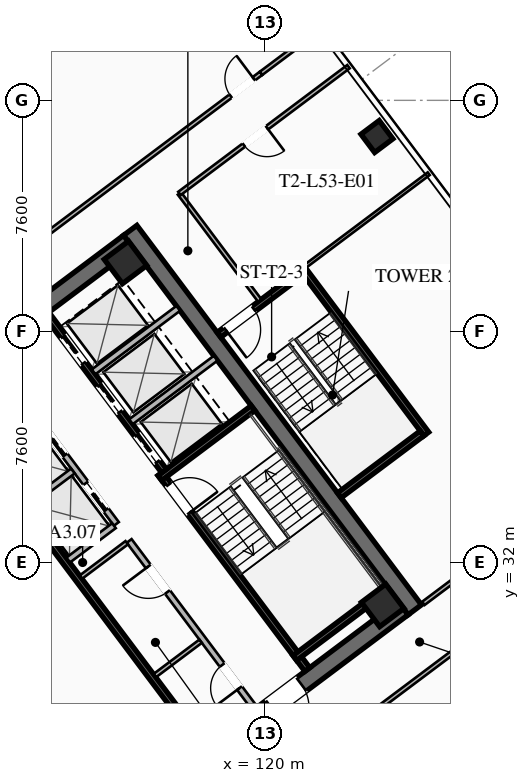
"""IFC4 building model, lengths in metres.
Left out: names, types, materials, properties, quantities, classifications, styles, units other than length and angle.
Written with IfcOpenShell. Run it as: python <this file> out.ifc"""

import sys

from ifc_helpers import new_model, si_unit, direction, frame, frame_2d, origin, origin_2d, place, context, subcontext, project, spatial, rectangle, hollow_rectangle, extrude, element, fill, save


model = new_model("IFC4")
c1 = context("Model", 3, precision=1e-05, world=origin(), true_north=direction((0.0, 1.0)))
c2 = subcontext(c1, "Body", "Model", "MODEL_VIEW")
j1 = project(units=[si_unit("LENGTHUNIT", "METRE"), si_unit("PLANEANGLEUNIT", "RADIAN")], contexts=[c1])
p1 = place(None, origin())
s1 = spatial("IfcSite", under=j1, at=p1, CompositionType="ELEMENT")
p2 = place(p1, origin())
s2 = spatial("IfcBuilding", under=s1, at=p2, CompositionType="ELEMENT")
p3 = place(p2, frame((0.0, 0.0, 196.05)))
s3 = spatial("IfcBuildingStorey", under=s2, at=p3, CompositionType="ELEMENT", Elevation=196.05)
p4 = place(p3, frame((115.564, 42.923, 0.0), z_axis=(0.0, 0.0, 1.0), x_axis=(0.600005007985, -0.799996243986, 0.0)))
e1 = element("IfcWall", 1, at=p4, inside=s3, PredefinedType="SHEAR", context=c2, shape_type="SweptSolid", body=[
    extrude(rectangle(XDim=15.6, YDim=0.55, at=frame_2d((7.8, 0.0))), origin(), (0.0, 0.0, 1.0), 3.55),
])
p5 = place(p3, frame((124.539, 30.498, 0.0), z_axis=(0.0, 0.0, 1.0), x_axis=(-0.799998054672, -0.600002593761, 0.0)))
e2 = element("IfcWall", 2, at=p5, inside=s3, PredefinedType="SHEAR", context=c2, shape_type="SweptSolid", body=[
    extrude(rectangle(XDim=15.06, YDim=0.55, at=frame_2d((7.53, 0.0))), origin(), (0.0, 0.0, 1.0), 3.55),
])
p6 = place(p5, frame((9.23, 0.0, 0.0)))
e3 = element("IfcOpeningElement", 3, at=p6, cuts=e2, PredefinedType="OPENING", context=c2, shape_type="SweptSolid", body=[
    extrude(rectangle(XDim=1.25, YDim=2.25, at=frame_2d((0.625, 1.125))), frame((0.0, 0.285, 0.0), z_axis=(0.0, -1.0, 0.0), x_axis=(1.0, 0.0, 0.0)), (0.0, 0.0, 1.0), 0.57),
])
p7 = place(p5, frame((4.18, 0.0, 0.0)))
e4 = element("IfcOpeningElement", 4, at=p7, cuts=e2, PredefinedType="OPENING", context=c2, shape_type="SweptSolid", body=[
    extrude(rectangle(XDim=1.25, YDim=2.25, at=frame_2d((0.625, 1.125))), frame((0.0, 0.285, 0.0), z_axis=(0.0, -1.0, 0.0), x_axis=(1.0, 0.0, 0.0)), (0.0, 0.0, 1.0), 0.57),
])
p8 = place(p3, frame((103.461, 33.502, 0.0), z_axis=(0.0, 0.0, 1.0), x_axis=(0.799998054672, 0.600002593761, 0.0)))
e5 = element("IfcWall", 5, at=p8, inside=s3, PredefinedType="SHEAR", context=c2, shape_type="SweptSolid", body=[
    extrude(rectangle(XDim=15.06, YDim=0.55, at=frame_2d((7.53, 0.0))), origin(), (0.0, 0.0, 1.0), 3.55),
])
p9 = place(p8, frame((4.58, 0.0, 0.0)))
e6 = element("IfcOpeningElement", 6, at=p9, cuts=e5, PredefinedType="OPENING", context=c2, shape_type="SweptSolid", body=[
    extrude(rectangle(XDim=1.25, YDim=2.25, at=frame_2d((0.625, 1.125))), frame((0.0, 0.285, 0.0), z_axis=(0.0, -1.0, 0.0), x_axis=(1.0, 0.0, 0.0)), (0.0, 0.0, 1.0), 0.57),
])
p10 = place(p8, frame((9.63, 0.0, 0.0)))
e7 = element("IfcOpeningElement", 7, at=p10, cuts=e5, PredefinedType="OPENING", context=c2, shape_type="SweptSolid", body=[
    extrude(rectangle(XDim=1.25, YDim=2.25, at=frame_2d((0.625, 1.125))), frame((0.0, 0.285, 0.0), z_axis=(0.0, -1.0, 0.0), x_axis=(1.0, 0.0, 0.0)), (0.0, 0.0, 1.0), 0.57),
])
for number, where, z_axis, x_axis in (
    (8, (123.87, 30.59, 0.0), (0.0, 0.0, 1.0), (0.8, 0.6, 0.0)),
    (9, (115.41, 41.87, 0.0), (0.0, 0.0, 1.0), (0.8, 0.6, 0.0)),
):
    element("IfcColumn", number, at=place(p3, frame(where, z_axis=z_axis, x_axis=x_axis)), inside=s3, PredefinedType="COLUMN", context=c2, shape_type="SweptSolid", body=[
        extrude(hollow_rectangle(XDim=1.0, YDim=1.0, WallThickness=0.04, at=origin_2d()), origin(), (0.0, 0.0, 1.0), 3.25),
    ])
p11 = place(p3, frame((123.68, 46.01, 0.0), z_axis=(0.0, 0.0, 1.0), x_axis=(0.799999996291, 0.600000004945, 0.0)))
e10 = element("IfcColumn", 10, at=p11, inside=s3, PredefinedType="COLUMN", context=c2, shape_type="SweptSolid", body=[
    extrude(hollow_rectangle(XDim=0.75, YDim=0.75, WallThickness=0.032, at=origin_2d()), origin(), (0.0, 0.0, 1.0), 3.25),
])
p12 = place(p3, frame((116.56, 34.92, 0.0), z_axis=(0.0, 0.0, 1.0), x_axis=(0.59999029481, -0.8000072788, 0.0)))
e11 = element("IfcWall", 11, at=p12, inside=s3, PredefinedType="SHEAR", context=c2, shape_type="SweptSolid", body=[
    extrude(rectangle(XDim=8.05, YDim=0.2, at=frame_2d((4.025, 0.0))), origin(), (0.0, 0.0, 1.0), 3.25),
])
p13 = place(p12, frame((0.45, 0.0, 0.0)))
e12 = element("IfcOpeningElement", 12, at=p13, cuts=e11, PredefinedType="OPENING", context=c2, shape_type="SweptSolid", body=[
    extrude(rectangle(XDim=1.15, YDim=2.2, at=frame_2d((0.575, 1.1))), frame((0.0, 0.11, 0.0), z_axis=(0.0, -1.0, 0.0), x_axis=(1.0, 0.0, 0.0)), (0.0, 0.0, 1.0), 0.22),
])
for number, where, z_axis, x_axis in (
    (13, (116.54, 34.78, 0.0), (0.0, 0.0, 1.0), (0.8, 0.6, 0.0)),
    (14, (120.98, 28.86, 0.0), (0.0, 0.0, 1.0), (0.8, 0.6, 0.0)),
):
    element("IfcWall", number, at=place(p3, frame(where, z_axis=z_axis, x_axis=x_axis)), inside=s3, PredefinedType="SHEAR", context=c2, shape_type="SweptSolid", body=[
        extrude(rectangle(XDim=3.83, YDim=0.2, at=frame_2d((1.915, 0.0))), origin(), (0.0, 0.0, 1.0), 3.25),
    ])
p14 = place(p3, frame((117.998, 25.936, 0.0), z_axis=(0.0, 0.0, 1.0), x_axis=(-0.600002693989, 0.799997979501, 0.0)))
e15 = element("IfcWall", 15, at=p14, inside=s3, PredefinedType="SHEAR", context=c2, shape_type="SweptSolid", body=[
    extrude(rectangle(XDim=14.5, YDim=0.2, at=frame_2d((7.25, 0.0))), origin(), (0.0, 0.0, 1.0), 3.25),
])
p15 = place(p3, frame((114.316, 25.412, 0.0), z_axis=(0.0, 0.0, 1.0), x_axis=(0.800018601094, 0.59997519774, 0.0)))
e16 = element("IfcWall", 16, at=p15, inside=s3, PredefinedType="SOLIDWALL", context=c2, shape_type="SweptSolid", body=[
    extrude(rectangle(XDim=3.15, YDim=0.22, at=frame_2d((1.575, 0.0))), origin(), (0.0, 0.0, 1.0), 2.393),
])
p16 = place(p15, frame((0.95, 0.0, 0.0)))
e17 = element("IfcOpeningElement", 17, at=p16, cuts=e16, PredefinedType="OPENING", context=c2, shape_type="SweptSolid", body=[
    extrude(rectangle(XDim=1.25, YDim=2.25, at=frame_2d((0.625, 1.125))), frame((0.0, 0.12, 0.0), z_axis=(0.0, -1.0, 0.0), x_axis=(1.0, 0.0, 0.0)), (0.0, 0.0, 1.0), 0.24),
])
p17 = place(p3, frame((115.19, 23.83, 0.0), z_axis=(0.0, 0.0, 1.0), x_axis=(-0.599993943644, 0.800004542231, 0.0)))
e18 = element("IfcWall", 18, at=p17, inside=s3, PredefinedType="SHEAR", context=c2, shape_type="SweptSolid", body=[
    extrude(rectangle(XDim=6.45, YDim=0.2, at=frame_2d((3.225, 0.0))), origin(), (0.0, 0.0, 1.0), 3.25),
])
p18 = place(p17, frame((4.875, 0.0, 0.0)))
e19 = element("IfcOpeningElement", 19, at=p18, cuts=e18, PredefinedType="OPENING", context=c2, shape_type="SweptSolid", body=[
    extrude(rectangle(XDim=1.3, YDim=2.25, at=frame_2d((0.65, 1.125))), frame((0.0, 0.11, 0.0), z_axis=(0.0, -1.0, 0.0), x_axis=(1.0, 0.0, 0.0)), (0.0, 0.0, 1.0), 0.22),
])
p19 = place(p17, frame((2.875, 0.0, 0.0)))
e20 = element("IfcOpeningElement", 20, at=p19, cuts=e18, PredefinedType="OPENING", context=c2, shape_type="SweptSolid", body=[
    extrude(rectangle(XDim=1.3, YDim=2.25, at=frame_2d((0.65, 1.125))), frame((0.0, 0.11, 0.0), z_axis=(0.0, -1.0, 0.0), x_axis=(1.0, 0.0, 0.0)), (0.0, 0.0, 1.0), 0.22),
])
p20 = place(p17, frame((0.675, 0.0, 0.0)))
e21 = element("IfcOpeningElement", 21, at=p20, cuts=e18, PredefinedType="OPENING", context=c2, shape_type="SweptSolid", body=[
    extrude(rectangle(XDim=1.3, YDim=2.25, at=frame_2d((0.65, 1.125))), frame((0.0, 0.11, 0.0), z_axis=(0.0, -1.0, 0.0), x_axis=(1.0, 0.0, 0.0)), (0.0, 0.0, 1.0), 0.22),
])
p21 = place(p3, frame((112.81, 40.17, 0.0), z_axis=(0.0, 0.0, 1.0), x_axis=(0.599993943644, -0.800004542231, 0.0)))
e22 = element("IfcWall", 22, at=p21, inside=s3, PredefinedType="SHEAR", context=c2, shape_type="SweptSolid", body=[
    extrude(rectangle(XDim=6.45, YDim=0.2, at=frame_2d((3.225, 0.0))), origin(), (0.0, 0.0, 1.0), 3.25),
])
p22 = place(p21, frame((4.975, 0.0, 0.0)))
e23 = element("IfcOpeningElement", 23, at=p22, cuts=e22, PredefinedType="OPENING", context=c2, shape_type="SweptSolid", body=[
    extrude(rectangle(XDim=1.1, YDim=2.2, at=frame_2d((0.55, 1.1))), frame((0.0, 0.11, 0.0), z_axis=(0.0, -1.0, 0.0), x_axis=(1.0, 0.0, 0.0)), (0.0, 0.0, 1.0), 0.22),
])
p23 = place(p21, frame((2.925, 0.0, 0.0)))
e24 = element("IfcOpeningElement", 24, at=p23, cuts=e22, PredefinedType="OPENING", context=c2, shape_type="SweptSolid", body=[
    extrude(rectangle(XDim=1.1, YDim=2.2, at=frame_2d((0.55, 1.1))), frame((0.0, 0.11, 0.0), z_axis=(0.0, -1.0, 0.0), x_axis=(1.0, 0.0, 0.0)), (0.0, 0.0, 1.0), 0.22),
])
p24 = place(p21, frame((0.925, 0.0, 0.0)))
e25 = element("IfcOpeningElement", 25, at=p24, cuts=e22, PredefinedType="OPENING", context=c2, shape_type="SweptSolid", body=[
    extrude(rectangle(XDim=1.1, YDim=2.2, at=frame_2d((0.55, 1.1))), frame((0.0, 0.11, 0.0), z_axis=(0.0, -1.0, 0.0), x_axis=(1.0, 0.0, 0.0)), (0.0, 0.0, 1.0), 0.22),
])
for number, where, z_axis, x_axis in (
    (26, (115.59, 36.63, 0.0), (0.0, 0.0, 1.0), (0.8, 0.6, 0.0)),
    (27, (114.36, 38.27, 0.0), (0.0, 0.0, 1.0), (0.8, 0.6, 0.0)),
):
    element("IfcWall", number, at=place(p3, frame(where, z_axis=z_axis, x_axis=x_axis)), inside=s3, PredefinedType="SOLIDWALL", context=c2, shape_type="SweptSolid", body=[
        extrude(rectangle(XDim=3.48, YDim=0.2, at=frame_2d((1.74, 0.0))), origin(), (0.0, 0.0, 1.0), 3.25),
    ])
p25 = place(p3, frame((119.67, 27.19, 0.0), z_axis=(0.0, 0.0, 1.0), x_axis=(-0.599988677396, 0.800008491828, 0.0)))
e28 = element("IfcWall", 28, at=p25, inside=s3, PredefinedType="SOLIDWALL", context=c2, shape_type="SweptSolid", body=[
    extrude(rectangle(XDim=6.9, YDim=0.2, at=frame_2d((3.45, 0.0))), origin(), (0.0, 0.0, 1.0), 2.393),
])
p26 = place(p25, frame((0.85, 0.0, 0.0)))
e29 = element("IfcOpeningElement", 29, at=p26, cuts=e28, PredefinedType="OPENING", context=c2, shape_type="SweptSolid", body=[
    extrude(rectangle(XDim=0.95, YDim=2.05, at=frame_2d((0.475, 1.025))), frame((0.0, 0.11, 0.0), z_axis=(0.0, -1.0, 0.0), x_axis=(1.0, 0.0, 0.0)), (0.0, 0.0, 1.0), 0.22),
])
p27 = place(p25, frame((4.8, 0.0, 0.0)))
e30 = element("IfcOpeningElement", 30, at=p27, cuts=e28, PredefinedType="OPENING", context=c2, shape_type="SweptSolid", body=[
    extrude(rectangle(XDim=1.05, YDim=2.2, at=frame_2d((0.525, 1.1))), frame((0.0, 0.11, 0.0), z_axis=(0.0, -1.0, 0.0), x_axis=(1.0, 0.0, 0.0)), (0.0, 0.0, 1.0), 0.22),
])
for number, where, z_axis, x_axis in (
    (31, (113.946, 31.522, 0.0), (0.0, 0.0, 1.0), (0.8, 0.6, 0.0)),
    (32, (116.376, 28.282, 0.0), (0.0, 0.0, 1.0), (0.8, 0.6, 0.0)),
):
    element("IfcWall", number, at=place(p3, frame(where, z_axis=z_axis, x_axis=x_axis)), inside=s3, PredefinedType="PARTITIONING", context=c2, shape_type="SweptSolid", body=[
        extrude(rectangle(XDim=1.88, YDim=0.135, at=frame_2d((0.94, 0.0))), origin(), (0.0, 0.0, 1.0), 2.393),
    ])
p28 = place(p3, frame((115.11, 33.27, 0.0), z_axis=(0.0, 0.0, 1.0), x_axis=(-0.600011322243, 0.799991508192, 0.0)))
e33 = element("IfcWall", 33, at=p28, inside=s3, PredefinedType="SOLIDWALL", context=c2, shape_type="SweptSolid", body=[
    extrude(rectangle(XDim=6.9, YDim=0.2, at=frame_2d((3.45, 0.0))), origin(), (0.0, 0.0, 1.0), 3.25),
])
p29 = place(p28, frame((0.575, 0.0, 0.0)))
e34 = element("IfcOpeningElement", 34, at=p29, cuts=e33, PredefinedType="OPENING", context=c2, shape_type="SweptSolid", body=[
    extrude(rectangle(XDim=1.1, YDim=2.2, at=frame_2d((0.55, 1.1))), frame((0.0, 0.11, 0.0), z_axis=(0.0, -1.0, 0.0), x_axis=(1.0, 0.0, 0.0)), (0.0, 0.0, 1.0), 0.22),
])
p30 = place(p28, frame((2.825, 0.0, 0.0)))
e35 = element("IfcOpeningElement", 35, at=p30, cuts=e33, PredefinedType="OPENING", context=c2, shape_type="SweptSolid", body=[
    extrude(rectangle(XDim=1.1, YDim=2.2, at=frame_2d((0.55, 1.1))), frame((0.0, 0.11, 0.0), z_axis=(0.0, -1.0, 0.0), x_axis=(1.0, 0.0, 0.0)), (0.0, 0.0, 1.0), 0.22),
])
p31 = place(p28, frame((5.075, 0.0, 0.0)))
e36 = element("IfcOpeningElement", 36, at=p31, cuts=e33, PredefinedType="OPENING", context=c2, shape_type="SweptSolid", body=[
    extrude(rectangle(XDim=1.1, YDim=2.2, at=frame_2d((0.55, 1.1))), frame((0.0, 0.11, 0.0), z_axis=(0.0, -1.0, 0.0), x_axis=(1.0, 0.0, 0.0)), (0.0, 0.0, 1.0), 0.22),
])
p32 = place(p3, frame((113.526, 32.082, 0.0), z_axis=(0.0, 0.0, 1.0), x_axis=(0.800046745961, 0.599937666993, 0.0)))
e37 = element("IfcWall", 37, at=p32, inside=s3, PredefinedType="SOLIDWALL", context=c2, shape_type="SweptSolid", body=[
    extrude(rectangle(XDim=1.88, YDim=0.2, at=frame_2d((0.94, 0.0))), origin(), (0.0, 0.0, 1.0), 3.25),
])
p33 = place(p3, frame((112.176, 33.882, 0.0), z_axis=(0.0, 0.0, 1.0), x_axis=(0.8, 0.6, 0.0)))
e38 = element("IfcWall", 38, at=p33, inside=s3, PredefinedType="SOLIDWALL", context=c2, shape_type="SweptSolid", body=[
    extrude(rectangle(XDim=1.88, YDim=0.2, at=frame_2d((0.94, 0.0))), origin(), (0.0, 0.0, 1.0), 3.25),
])
p34 = place(p3, frame((125.304, 36.228, 0.0), z_axis=(0.0, 0.0, 1.0), x_axis=(-0.59998851072, 0.800008616831, 0.0)))
e39 = element("IfcWall", 39, at=p34, inside=s3, PredefinedType="SHEAR", context=c2, shape_type="SweptSolid", body=[
    extrude(rectangle(XDim=6.8, YDim=0.2, at=frame_2d((3.4, 0.0))), origin(), (0.0, 0.0, 1.0), 3.25),
])
p35 = place(p3, frame((121.204, 41.528, 0.0), z_axis=(0.0, 0.0, 1.0), x_axis=(-0.800017232136, -0.599977023131, 0.0)))
e40 = element("IfcWall", 40, at=p35, inside=s3, PredefinedType="SHEAR", context=c2, shape_type="SweptSolid", body=[
    extrude(rectangle(XDim=3.4, YDim=0.2, at=frame_2d((1.7, 0.0))), origin(), (0.0, 0.0, 1.0), 3.25),
])
p36 = place(p35, frame((1.975, 0.0, 0.0)))
e41 = element("IfcOpeningElement", 41, at=p36, cuts=e40, PredefinedType="OPENING", context=c2, shape_type="SweptSolid", body=[
    extrude(rectangle(XDim=1.15, YDim=2.2, at=frame_2d((0.575, 1.1))), frame((0.0, 0.11, 0.0), z_axis=(0.0, -1.0, 0.0), x_axis=(1.0, 0.0, 0.0)), (0.0, 0.0, 1.0), 0.22),
])
p37 = place(p3, frame((122.444, 34.208, 0.0), z_axis=(0.0, 0.0, 1.0), x_axis=(0.79999138319, 0.600011488909, 0.0)))
e42 = element("IfcWall", 42, at=p37, inside=s3, PredefinedType="SHEAR", context=c2, shape_type="SweptSolid", body=[
    extrude(rectangle(XDim=3.4, YDim=0.2, at=frame_2d((1.7, 0.0))), origin(), (0.0, 0.0, 1.0), 3.25),
])
p38 = place(p3, frame((119.824, 40.618, 0.0), z_axis=(0.0, 0.0, 1.0), x_axis=(-0.599982243973, 0.800013316712, 0.0)))
e43 = element("IfcWall", 43, at=p38, inside=s3, PredefinedType="PARTITIONING", context=c2, shape_type="SweptSolid", body=[
    extrude(rectangle(XDim=4.4, YDim=0.135, at=frame_2d((2.2, 0.0))), origin(), (0.0, 0.0, 1.0), 2.393),
])
p39 = place(p3, frame((96.91, 30.87, 0.0), z_axis=(0.0, 0.0, 1.0), x_axis=(0.800003062365, 0.599995916825, 0.0)))
e44 = element("IfcWall", 44, at=p39, inside=s3, PredefinedType="PARTITIONING", context=c2, shape_type="SweptSolid", body=[
    extrude(rectangle(XDim=28.7, YDim=0.135, at=frame_2d((14.35, 0.0))), origin(), (0.0, 0.0, 1.0), 2.393),
])
p40 = place(p39, frame((0.3, 0.0, 0.0)))
e45 = element("IfcOpeningElement", 45, at=p40, cuts=e44, PredefinedType="OPENING", context=c2, shape_type="SweptSolid", body=[
    extrude(rectangle(XDim=0.95, YDim=2.05, at=frame_2d((0.475, 1.025))), frame((0.0, 0.077, 0.0), z_axis=(0.0, -1.0, 0.0), x_axis=(1.0, 0.0, 0.0)), (0.0, 0.0, 1.0), 0.155),
])
p41 = place(p39, frame((27.45, 0.0, 0.0)))
e46 = element("IfcOpeningElement", 46, at=p41, cuts=e44, PredefinedType="OPENING", context=c2, shape_type="SweptSolid", body=[
    extrude(rectangle(XDim=0.95, YDim=2.05, at=frame_2d((0.475, 1.025))), frame((0.0, 0.077, 0.0), z_axis=(0.0, -1.0, 0.0), x_axis=(1.0, 0.0, 0.0)), (0.0, 0.0, 1.0), 0.155),
])
p42 = place(p3, frame((119.87, 48.09, 0.0), z_axis=(0.0, 0.0, 1.0), x_axis=(0.799975885537, 0.600032151272, 0.0)))
e47 = element("IfcWall", 47, at=p42, inside=s3, PredefinedType="PARTITIONING", context=c2, shape_type="SweptSolid", body=[
    extrude(rectangle(XDim=2.43, YDim=0.135, at=frame_2d((1.215, 0.0))), origin(), (0.0, 0.0, 1.0), 2.393),
])
p43 = place(p3, frame((131.282, 32.874, 0.0), z_axis=(0.0, 0.0, 1.0), x_axis=(-0.8, -0.6, 0.0)))
e48 = element("IfcWall", 48, at=p43, inside=s3, PredefinedType="PARTITIONING", context=c2, shape_type="SweptSolid", body=[
    extrude(rectangle(XDim=28.7, YDim=0.135, at=frame_2d((14.35, 0.0))), origin(), (0.0, 0.0, 1.0), 2.393),
])
p44 = place(p43, frame((27.37, 0.0, 0.0)))
e49 = element("IfcOpeningElement", 49, at=p44, cuts=e48, PredefinedType="OPENING", context=c2, shape_type="SweptSolid", body=[
    extrude(rectangle(XDim=0.95, YDim=2.05, at=frame_2d((0.475, 1.025))), frame((0.0, 0.077, 0.0), z_axis=(0.0, -1.0, 0.0), x_axis=(1.0, 0.0, 0.0)), (0.0, 0.0, 1.0), 0.155),
])
p45 = place(p43, frame((0.38, 0.0, 0.0)))
e50 = element("IfcOpeningElement", 50, at=p45, cuts=e48, PredefinedType="OPENING", context=c2, shape_type="SweptSolid", body=[
    extrude(rectangle(XDim=0.95, YDim=2.05, at=frame_2d((0.475, 1.025))), frame((0.0, 0.077, 0.0), z_axis=(0.0, -1.0, 0.0), x_axis=(1.0, 0.0, 0.0)), (0.0, 0.0, 1.0), 0.155),
])
p46 = place(p3, frame((122.744, 48.308, 0.0), z_axis=(0.0, 0.0, 1.0), x_axis=(-0.79997892247, -0.600028102345, 0.0)))
e51 = element("IfcWall", 51, at=p46, inside=s3, PredefinedType="PARTITIONING", context=c2, shape_type="SweptSolid", body=[
    extrude(rectangle(XDim=6.95, YDim=0.135, at=frame_2d((3.475, 0.0))), origin(), (0.0, 0.0, 1.0), 2.393),
])
p47 = place(p46, frame((3.35, 0.0, 0.0)))
e52 = element("IfcOpeningElement", 52, at=p47, cuts=e51, PredefinedType="OPENING", context=c2, shape_type="SweptSolid", body=[
    extrude(rectangle(XDim=0.95, YDim=2.05, at=frame_2d((0.475, 1.025))), frame((0.0, 0.077, 0.0), z_axis=(0.0, -1.0, 0.0), x_axis=(1.0, 0.0, 0.0)), (0.0, 0.0, 1.0), 0.155),
])
p48 = place(p3, frame((125.208, 30.656, 0.0), z_axis=(0.0, 0.0, 1.0), x_axis=(0.800006797429, 0.599990936654, 0.0)))
e53 = element("IfcWall", 53, at=p48, inside=s3, PredefinedType="PARTITIONING", context=c2, shape_type="SweptSolid", body=[
    extrude(rectangle(XDim=8.62, YDim=0.135, at=frame_2d((4.31, 0.0))), origin(), (0.0, 0.0, 1.0), 2.393),
])
p49 = place(p48, frame((2.045, 0.0, 0.0)))
e54 = element("IfcOpeningElement", 54, at=p49, cuts=e53, PredefinedType="OPENING", context=c2, shape_type="SweptSolid", body=[
    extrude(rectangle(XDim=0.95, YDim=2.05, at=frame_2d((0.475, 1.025))), frame((0.0, 0.077, 0.0), z_axis=(0.0, -1.0, 0.0), x_axis=(1.0, 0.0, 0.0)), (0.0, 0.0, 1.0), 0.155),
])
p50 = place(p3, frame((125.384, 44.788, 0.0), z_axis=(0.0, 0.0, 1.0), x_axis=(-0.8, -0.6, 0.0)))
e55 = element("IfcWall", 55, at=p50, inside=s3, PredefinedType="PARTITIONING", context=c2, shape_type="SweptSolid", body=[
    extrude(rectangle(XDim=5.1, YDim=0.11, at=frame_2d((2.55, 0.0))), origin(), (0.0, 0.0, 1.0), 2.393),
])
p51 = place(p7, origin())
e56 = element("IfcDoor", 56, at=p51, inside=s3, OperationType="SINGLE_SWING_RIGHT", PredefinedType="DOOR", context=c2, shape_type="SweptSolid", body=[
    extrude(rectangle(XDim=1.25, YDim=2.25, at=frame_2d((0.625, 1.125))), frame((0.0, 0.025, 0.0), z_axis=(0.0, -1.0, 0.0), x_axis=(1.0, 0.0, 0.0)), (0.0, 0.0, 1.0), 0.05),
])
fill(e4, e56)
p52 = place(p13, origin())
e57 = element("IfcDoor", 57, at=p52, inside=s3, OperationType="SINGLE_SWING_RIGHT", PredefinedType="DOOR", context=c2, shape_type="SweptSolid", body=[
    extrude(rectangle(XDim=1.15, YDim=2.2, at=frame_2d((0.575, 1.1))), frame((0.0, 0.025, 0.0), z_axis=(0.0, -1.0, 0.0), x_axis=(1.0, 0.0, 0.0)), (0.0, 0.0, 1.0), 0.05),
])
fill(e12, e57)
p53 = place(p26, origin())
e58 = element("IfcDoor", 58, at=p53, inside=s3, OperationType="SINGLE_SWING_LEFT", PredefinedType="DOOR", context=c2, shape_type="SweptSolid", body=[
    extrude(rectangle(XDim=0.95, YDim=2.05, at=frame_2d((0.475, 1.025))), frame((0.0, 0.025, 0.0), z_axis=(0.0, -1.0, 0.0), x_axis=(1.0, 0.0, 0.0)), (0.0, 0.0, 1.0), 0.05),
])
fill(e29, e58)
p54 = place(p27, origin())
e59 = element("IfcDoor", 59, at=p54, inside=s3, OperationType="SINGLE_SWING_RIGHT", PredefinedType="DOOR", context=c2, shape_type="SweptSolid", body=[
    extrude(rectangle(XDim=1.05, YDim=2.2, at=frame_2d((0.525, 1.1))), frame((0.0, 0.025, 0.0), z_axis=(0.0, -1.0, 0.0), x_axis=(1.0, 0.0, 0.0)), (0.0, 0.0, 1.0), 0.05),
])
fill(e30, e59)
p55 = place(p36, origin())
e60 = element("IfcDoor", 60, at=p55, inside=s3, OperationType="SINGLE_SWING_RIGHT", PredefinedType="DOOR", context=c2, shape_type="SweptSolid", body=[
    extrude(rectangle(XDim=1.15, YDim=2.2, at=frame_2d((0.575, 1.1))), frame((0.0, 0.025, 0.0), z_axis=(0.0, -1.0, 0.0), x_axis=(1.0, 0.0, 0.0)), (0.0, 0.0, 1.0), 0.05),
])
fill(e41, e60)
p56 = place(p41, origin())
e61 = element("IfcDoor", 61, at=p56, inside=s3, OperationType="SINGLE_SWING_RIGHT", PredefinedType="DOOR", context=c2, shape_type="SweptSolid", body=[
    extrude(rectangle(XDim=0.95, YDim=2.05, at=frame_2d((0.475, 1.025))), frame((0.0, 0.025, 0.0), z_axis=(0.0, -1.0, 0.0), x_axis=(1.0, 0.0, 0.0)), (0.0, 0.0, 1.0), 0.05),
])
fill(e46, e61)
p57 = place(p47, origin())
e62 = element("IfcDoor", 62, at=p57, inside=s3, OperationType="SINGLE_SWING_LEFT", PredefinedType="DOOR", context=c2, shape_type="SweptSolid", body=[
    extrude(rectangle(XDim=0.95, YDim=2.05, at=frame_2d((0.475, 1.025))), frame((0.0, 0.025, 0.0), z_axis=(0.0, -1.0, 0.0), x_axis=(1.0, 0.0, 0.0)), (0.0, 0.0, 1.0), 0.05),
])
fill(e52, e62)
p58 = place(p29, origin())
e63 = element("IfcDoor", 63, at=p58, inside=s3, OperationType="SLIDING_TO_LEFT", PredefinedType="DOOR", context=c2, shape_type="SweptSolid", body=[
    extrude(rectangle(XDim=1.1, YDim=2.2, at=frame_2d((0.55, 1.1))), frame((0.0, 0.025, 0.0), z_axis=(0.0, -1.0, 0.0), x_axis=(1.0, 0.0, 0.0)), (0.0, 0.0, 1.0), 0.05),
])
fill(e34, e63)
p59 = place(p30, origin())
e64 = element("IfcDoor", 64, at=p59, inside=s3, OperationType="SLIDING_TO_LEFT", PredefinedType="DOOR", context=c2, shape_type="SweptSolid", body=[
    extrude(rectangle(XDim=1.1, YDim=2.2, at=frame_2d((0.55, 1.1))), frame((0.0, 0.025, 0.0), z_axis=(0.0, -1.0, 0.0), x_axis=(1.0, 0.0, 0.0)), (0.0, 0.0, 1.0), 0.05),
])
fill(e35, e64)
p60 = place(p22, origin())
e65 = element("IfcDoor", 65, at=p60, inside=s3, OperationType="SLIDING_TO_LEFT", PredefinedType="DOOR", context=c2, shape_type="SweptSolid", body=[
    extrude(rectangle(XDim=1.1, YDim=2.2, at=frame_2d((0.55, 1.1))), frame((0.0, 0.025, 0.0), z_axis=(0.0, -1.0, 0.0), x_axis=(1.0, 0.0, 0.0)), (0.0, 0.0, 1.0), 0.05),
])
fill(e23, e65)
p61 = place(p23, origin())
e66 = element("IfcDoor", 66, at=p61, inside=s3, OperationType="SLIDING_TO_LEFT", PredefinedType="DOOR", context=c2, shape_type="SweptSolid", body=[
    extrude(rectangle(XDim=1.1, YDim=2.2, at=frame_2d((0.55, 1.1))), frame((0.0, 0.025, 0.0), z_axis=(0.0, -1.0, 0.0), x_axis=(1.0, 0.0, 0.0)), (0.0, 0.0, 1.0), 0.05),
])
fill(e24, e66)
p62 = place(p24, origin())
e67 = element("IfcDoor", 67, at=p62, inside=s3, OperationType="SLIDING_TO_LEFT", PredefinedType="DOOR", context=c2, shape_type="SweptSolid", body=[
    extrude(rectangle(XDim=1.1, YDim=2.2, at=frame_2d((0.55, 1.1))), frame((0.0, 0.025, 0.0), z_axis=(0.0, -1.0, 0.0), x_axis=(1.0, 0.0, 0.0)), (0.0, 0.0, 1.0), 0.05),
])
fill(e25, e67)
save(model, sys.argv[1])
